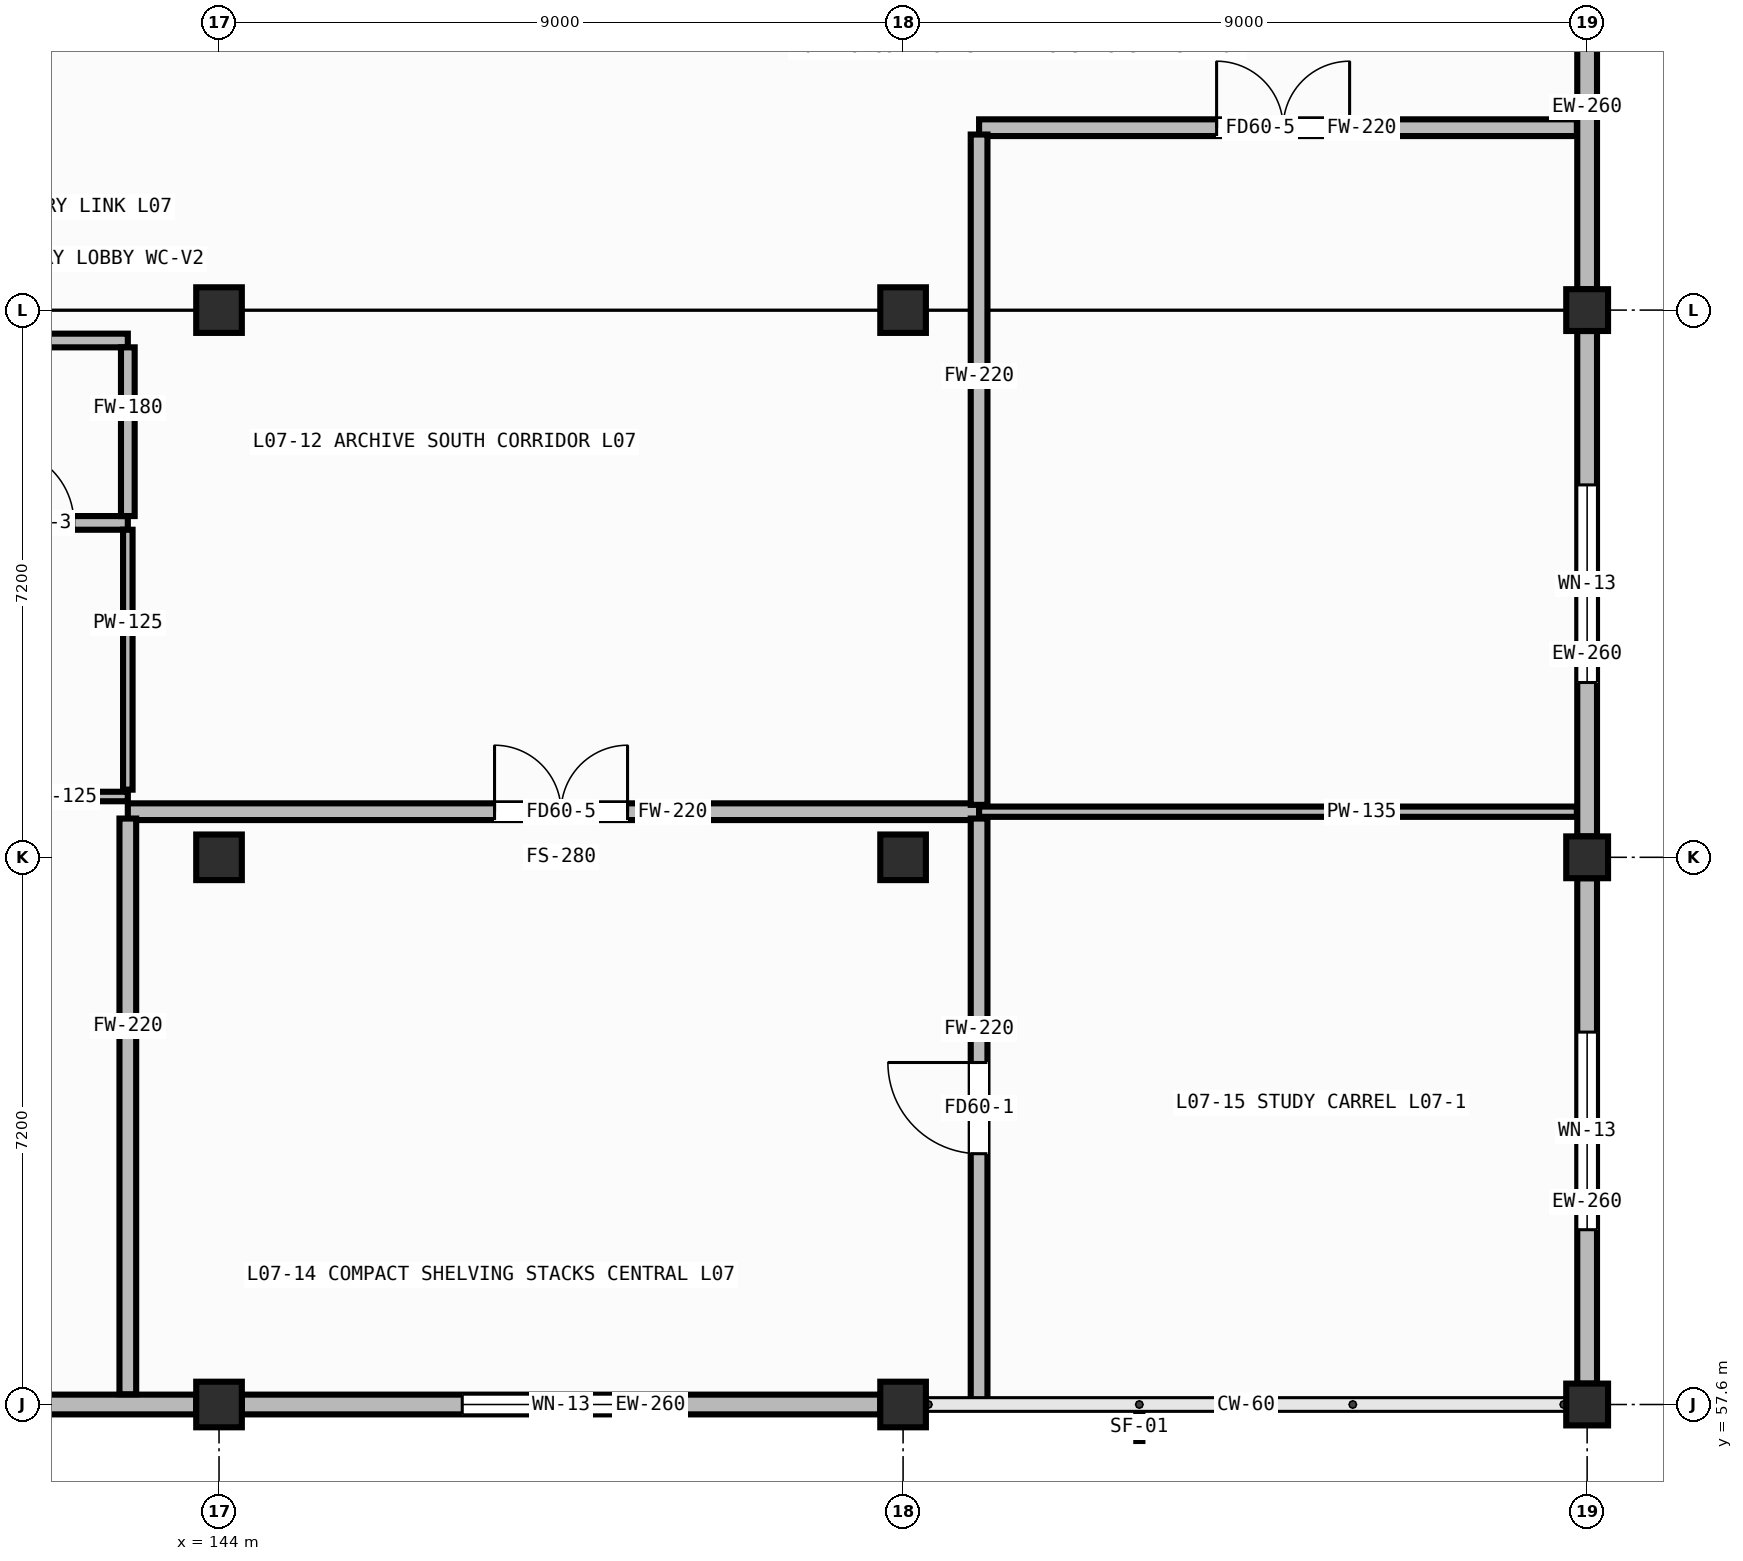
"""IFC4 building model, lengths in metres.
Left out: names, types, materials, properties, quantities, classifications, styles, units other than length and angle.
Written with IfcOpenShell. Run it as: python <this file> out.ifc"""

import sys

from ifc_helpers import new_model, si_unit, direction, frame, frame_2d, origin, origin_2d, place, context, subcontext, project, spatial, rectangle, hollow_rectangle, extrude, element, fill, save


model = new_model("IFC4")
c1 = context("Model", 3, precision=1e-05, world=origin(), true_north=direction((0.0, 1.0)))
c2 = subcontext(c1, "Body", "Model", "MODEL_VIEW")
j1 = project(units=[si_unit("LENGTHUNIT", "METRE"), si_unit("PLANEANGLEUNIT", "RADIAN")], contexts=[c1])
p1 = place(None, origin())
s1 = spatial("IfcSite", under=j1, at=p1, CompositionType="ELEMENT")
p2 = place(p1, origin())
s2 = spatial("IfcBuilding", under=s1, at=p2, CompositionType="ELEMENT")
p3 = place(p2, frame((0.0, 0.0, 24.2)))
s3 = spatial("IfcBuildingStorey", under=s2, at=p3, CompositionType="ELEMENT", Elevation=24.2)
for number, where, z_axis, x_axis in (
    (1, (144.0, 57.6, 0.0), (0.0, 0.0, 1.0), (1.0, 0.0, 0.0)),
    (2, (144.0, 64.8, 0.0), (0.0, 0.0, 1.0), (1.0, 0.0, 0.0)),
    (3, (144.0, 72.0, 0.0), (0.0, 0.0, 1.0), (1.0, 0.0, 0.0)),
    (4, (153.0, 57.6, 0.0), (0.0, 0.0, 1.0), (1.0, 0.0, 0.0)),
    (5, (153.0, 64.8, 0.0), (0.0, 0.0, 1.0), (1.0, 0.0, 0.0)),
    (6, (153.0, 72.0, 0.0), (0.0, 0.0, 1.0), (1.0, 0.0, 0.0)),
):
    element("IfcColumn", number, at=place(p3, frame(where, z_axis=z_axis, x_axis=x_axis)), inside=s3, PredefinedType="COLUMN", context=c2, shape_type="SweptSolid", body=[
        extrude(hollow_rectangle(XDim=0.6, YDim=0.6, WallThickness=0.025, at=origin_2d()), origin(), (0.0, 0.0, 1.0), 3.6),
    ])
for number, where, z_axis, x_axis in (
    (7, (162.0, 57.6, 0.0), (0.0, 0.0, 1.0), (1.0, 0.0, 0.0)),
    (8, (162.0, 64.8, 0.0), (0.0, 0.0, 1.0), (1.0, 0.0, 0.0)),
    (9, (162.0, 72.0, 0.0), (0.0, 0.0, 1.0), (1.0, 0.0, 0.0)),
):
    element("IfcColumn", number, at=place(p3, frame(where, z_axis=z_axis, x_axis=x_axis)), inside=s3, PredefinedType="COLUMN", context=c2, shape_type="SweptSolid", body=[
        extrude(hollow_rectangle(XDim=0.55, YDim=0.55, WallThickness=0.022, at=origin_2d()), origin(), (0.0, 0.0, 1.0), 3.6),
    ])
p4 = place(p3, frame((135.3, 57.6, 0.0), z_axis=(0.0, 0.0, 1.0), x_axis=(1.0, 0.0, 0.0)))
e10 = element("IfcWall", 10, at=p4, inside=s3, PredefinedType="STANDARD", context=c2, shape_type="SweptSolid", body=[
    extrude(rectangle(XDim=8.4, YDim=0.26, at=frame_2d((4.2, 0.0))), origin(), (0.0, 0.0, 1.0), 2.92),
])
p5 = place(p4, frame((2.9, 0.0, 0.85)))
e11 = element("IfcOpeningElement", 11, at=p5, cuts=e10, PredefinedType="OPENING", context=c2, shape_type="SweptSolid", body=[
    extrude(rectangle(XDim=2.6, YDim=1.6, at=frame_2d((1.3, 0.8))), frame((0.0, 0.142, 0.0), z_axis=(0.0, -1.0, 0.0), x_axis=(1.0, 0.0, 0.0)), (0.0, 0.0, 1.0), 0.284),
])
p6 = place(p3, frame((144.3, 57.6, 0.0), z_axis=(0.0, 0.0, 1.0), x_axis=(1.0, 0.0, 0.0)))
e12 = element("IfcWall", 12, at=p6, inside=s3, PredefinedType="STANDARD", context=c2, shape_type="SweptSolid", body=[
    extrude(rectangle(XDim=8.4, YDim=0.26, at=frame_2d((4.2, 0.0))), origin(), (0.0, 0.0, 1.0), 2.92),
])
p7 = place(p6, frame((2.9, 0.0, 0.85)))
e13 = element("IfcOpeningElement", 13, at=p7, cuts=e12, PredefinedType="OPENING", context=c2, shape_type="SweptSolid", body=[
    extrude(rectangle(XDim=2.6, YDim=1.6, at=frame_2d((1.3, 0.8))), frame((0.0, 0.142, 0.0), z_axis=(0.0, -1.0, 0.0), x_axis=(1.0, 0.0, 0.0)), (0.0, 0.0, 1.0), 0.284),
])
p8 = place(p3, frame((162.0, 64.525, 0.0), z_axis=(0.0, 0.0, 1.0), x_axis=(0.0, -1.0, 0.0)))
e14 = element("IfcWall", 14, at=p8, inside=s3, PredefinedType="STANDARD", context=c2, shape_type="SweptSolid", body=[
    extrude(rectangle(XDim=6.65, YDim=0.26, at=frame_2d((3.325, 0.0))), origin(), (0.0, 0.0, 1.0), 2.92),
])
p9 = place(p8, frame((2.025, 0.0, 0.85)))
e15 = element("IfcOpeningElement", 15, at=p9, cuts=e14, PredefinedType="OPENING", context=c2, shape_type="SweptSolid", body=[
    extrude(rectangle(XDim=2.6, YDim=1.6, at=frame_2d((1.3, 0.8))), frame((0.0, 0.142, 0.0), z_axis=(0.0, -1.0, 0.0), x_axis=(1.0, 0.0, 0.0)), (0.0, 0.0, 1.0), 0.284),
])
p10 = place(p3, frame((162.0, 71.725, 0.0), z_axis=(0.0, 0.0, 1.0), x_axis=(0.0, -1.0, 0.0)))
e16 = element("IfcWall", 16, at=p10, inside=s3, PredefinedType="STANDARD", context=c2, shape_type="SweptSolid", body=[
    extrude(rectangle(XDim=6.65, YDim=0.26, at=frame_2d((3.325, 0.0))), origin(), (0.0, 0.0, 1.0), 2.92),
])
p11 = place(p10, frame((2.025, 0.0, 0.85)))
e17 = element("IfcOpeningElement", 17, at=p11, cuts=e16, PredefinedType="OPENING", context=c2, shape_type="SweptSolid", body=[
    extrude(rectangle(XDim=2.6, YDim=1.6, at=frame_2d((1.3, 0.8))), frame((0.0, 0.142, 0.0), z_axis=(0.0, -1.0, 0.0), x_axis=(1.0, 0.0, 0.0)), (0.0, 0.0, 1.0), 0.284),
])
p12 = place(p3, frame((162.0, 78.925, 0.0), z_axis=(0.0, 0.0, 1.0), x_axis=(0.0, -1.0, 0.0)))
e18 = element("IfcWall", 18, at=p12, inside=s3, PredefinedType="STANDARD", context=c2, shape_type="SweptSolid", body=[
    extrude(rectangle(XDim=6.65, YDim=0.26, at=frame_2d((3.325, 0.0))), origin(), (0.0, 0.0, 1.0), 2.92),
])
p13 = place(p3, frame((135.4, 69.2, 0.0), z_axis=(0.0, 0.0, 1.0), x_axis=(1.0, 0.0, 0.0)))
e19 = element("IfcWall", 19, at=p13, inside=s3, PredefinedType="PARTITIONING", context=c2, shape_type="SweptSolid", body=[
    extrude(rectangle(XDim=7.4, YDim=0.18, at=frame_2d((3.7, 0.0))), origin(), (0.0, 0.0, 1.0), 3.32),
])
p14 = place(p13, frame((0.75, 0.0, 0.0)))
e20 = element("IfcOpeningElement", 20, at=p14, cuts=e19, PredefinedType="OPENING", context=c2, shape_type="SweptSolid", body=[
    extrude(rectangle(XDim=1.0, YDim=2.08, at=frame_2d((0.5, 1.04))), frame((0.0, 0.102, 0.0), z_axis=(0.0, -1.0, 0.0), x_axis=(1.0, 0.0, 0.0)), (0.0, 0.0, 1.0), 0.204),
])
p15 = place(p13, frame((3.225, 0.0, 0.0)))
e21 = element("IfcOpeningElement", 21, at=p15, cuts=e19, PredefinedType="OPENING", context=c2, shape_type="SweptSolid", body=[
    extrude(rectangle(XDim=1.05, YDim=2.1, at=frame_2d((0.525, 1.05))), frame((0.0, 0.102, 0.0), z_axis=(0.0, -1.0, 0.0), x_axis=(1.0, 0.0, 0.0)), (0.0, 0.0, 1.0), 0.204),
])
p16 = place(p13, frame((5.71, 0.0, 0.0)))
e22 = element("IfcOpeningElement", 22, at=p16, cuts=e19, PredefinedType="OPENING", context=c2, shape_type="SweptSolid", body=[
    extrude(rectangle(XDim=0.98, YDim=2.02, at=frame_2d((0.49, 1.01))), frame((0.0, 0.102, 0.0), z_axis=(0.0, -1.0, 0.0), x_axis=(1.0, 0.0, 0.0)), (0.0, 0.0, 1.0), 0.204),
])
p17 = place(p3, frame((135.4, 71.6, 0.0), z_axis=(0.0, 0.0, 1.0), x_axis=(1.0, 0.0, 0.0)))
e23 = element("IfcWall", 23, at=p17, inside=s3, PredefinedType="PARTITIONING", context=c2, shape_type="SweptSolid", body=[
    extrude(rectangle(XDim=7.4, YDim=0.18, at=frame_2d((3.7, 0.0))), origin(), (0.0, 0.0, 1.0), 3.32),
])
p18 = place(p17, frame((3.11, 0.0, 0.0)))
e24 = element("IfcOpeningElement", 24, at=p18, cuts=e23, PredefinedType="OPENING", context=c2, shape_type="SweptSolid", body=[
    extrude(rectangle(XDim=0.98, YDim=2.02, at=frame_2d((0.49, 1.01))), frame((0.0, 0.102, 0.0), z_axis=(0.0, -1.0, 0.0), x_axis=(1.0, 0.0, 0.0)), (0.0, 0.0, 1.0), 0.204),
])
p19 = place(p3, frame((142.8, 69.29, 0.0), z_axis=(0.0, 0.0, 1.0), x_axis=(0.0, 1.0, 0.0)))
e25 = element("IfcWall", 25, at=p19, inside=s3, PredefinedType="PARTITIONING", context=c2, shape_type="SweptSolid", body=[
    extrude(rectangle(XDim=2.22, YDim=0.18, at=frame_2d((1.11, 0.0))), origin(), (0.0, 0.0, 1.0), 3.32),
])
p20 = place(p3, frame((140.4, 65.6, 0.0), z_axis=(0.0, 0.0, 1.0), x_axis=(1.0, 0.0, 0.0)))
e26 = element("IfcWall", 26, at=p20, inside=s3, PredefinedType="PARTITIONING", context=c2, shape_type="SweptSolid", body=[
    extrude(rectangle(XDim=2.4, YDim=0.125, at=frame_2d((1.2, 0.0))), origin(), (0.0, 0.0, 1.0), 3.32),
])
p21 = place(p3, frame((142.8, 65.69, 0.0), z_axis=(0.0, 0.0, 1.0), x_axis=(0.0, 1.0, 0.0)))
e27 = element("IfcWall", 27, at=p21, inside=s3, PredefinedType="PARTITIONING", context=c2, shape_type="SweptSolid", body=[
    extrude(rectangle(XDim=3.42, YDim=0.125, at=frame_2d((1.71, 0.0))), origin(), (0.0, 0.0, 1.0), 3.32),
])
p22 = place(p3, frame((142.8, 65.4, 0.0), z_axis=(0.0, 0.0, 1.0), x_axis=(1.0, 0.0, 0.0)))
e28 = element("IfcWall", 28, at=p22, inside=s3, PredefinedType="PARTITIONING", context=c2, shape_type="SweptSolid", body=[
    extrude(rectangle(XDim=11.2, YDim=0.22, at=frame_2d((5.6, 0.0))), origin(), (0.0, 0.0, 1.0), 3.32),
])
p23 = place(p22, frame((4.825, 0.0, 0.0)))
e29 = element("IfcOpeningElement", 29, at=p23, cuts=e28, PredefinedType="OPENING", context=c2, shape_type="SweptSolid", body=[
    extrude(rectangle(XDim=1.75, YDim=2.12, at=frame_2d((0.875, 1.06))), frame((0.0, 0.122, 0.0), z_axis=(0.0, -1.0, 0.0), x_axis=(1.0, 0.0, 0.0)), (0.0, 0.0, 1.0), 0.244),
])
p24 = place(p3, frame((142.8, 57.735, 0.0), z_axis=(0.0, 0.0, 1.0), x_axis=(0.0, 1.0, 0.0)))
e30 = element("IfcWall", 30, at=p24, inside=s3, PredefinedType="PARTITIONING", context=c2, shape_type="SweptSolid", body=[
    extrude(rectangle(XDim=7.575, YDim=0.22, at=frame_2d((3.788, 0.0))), origin(), (0.0, 0.0, 1.0), 3.32),
])
p25 = place(p3, frame((154.0, 57.635, 0.0), z_axis=(0.0, 0.0, 1.0), x_axis=(0.0, 1.0, 0.0)))
e31 = element("IfcWall", 31, at=p25, inside=s3, PredefinedType="PARTITIONING", context=c2, shape_type="SweptSolid", body=[
    extrude(rectangle(XDim=7.675, YDim=0.22, at=frame_2d((3.837, 0.0))), origin(), (0.0, 0.0, 1.0), 3.32),
])
p26 = place(p25, frame((3.265, 0.0, 0.0)))
e32 = element("IfcOpeningElement", 32, at=p26, cuts=e31, PredefinedType="OPENING", context=c2, shape_type="SweptSolid", body=[
    extrude(rectangle(XDim=1.2, YDim=2.1, at=frame_2d((0.6, 1.05))), frame((0.0, 0.122, 0.0), z_axis=(0.0, -1.0, 0.0), x_axis=(1.0, 0.0, 0.0)), (0.0, 0.0, 1.0), 0.244),
])
p27 = place(p3, frame((154.0, 65.4, 0.0), z_axis=(0.0, 0.0, 1.0), x_axis=(1.0, 0.0, 0.0)))
e33 = element("IfcWall", 33, at=p27, inside=s3, PredefinedType="PARTITIONING", context=c2, shape_type="SweptSolid", body=[
    extrude(rectangle(XDim=7.865, YDim=0.135, at=frame_2d((3.933, 0.0))), origin(), (0.0, 0.0, 1.0), 3.32),
])
p28 = place(p3, frame((154.0, 74.4, 0.0), z_axis=(0.0, 0.0, 1.0), x_axis=(1.0, 0.0, 0.0)))
e34 = element("IfcWall", 34, at=p28, inside=s3, PredefinedType="PARTITIONING", context=c2, shape_type="SweptSolid", body=[
    extrude(rectangle(XDim=7.865, YDim=0.22, at=frame_2d((3.933, 0.0))), origin(), (0.0, 0.0, 1.0), 3.32),
])
p29 = place(p28, frame((3.125, 0.0, 0.0)))
e35 = element("IfcOpeningElement", 35, at=p29, cuts=e34, PredefinedType="OPENING", context=c2, shape_type="SweptSolid", body=[
    extrude(rectangle(XDim=1.75, YDim=2.12, at=frame_2d((0.875, 1.06))), frame((0.0, 0.122, 0.0), z_axis=(0.0, -1.0, 0.0), x_axis=(1.0, 0.0, 0.0)), (0.0, 0.0, 1.0), 0.244),
])
p30 = place(p3, frame((154.0, 65.49, 0.0), z_axis=(0.0, 0.0, 1.0), x_axis=(0.0, 1.0, 0.0)))
e36 = element("IfcWall", 36, at=p30, inside=s3, PredefinedType="PARTITIONING", context=c2, shape_type="SweptSolid", body=[
    extrude(rectangle(XDim=8.82, YDim=0.22, at=frame_2d((4.41, 0.0))), origin(), (0.0, 0.0, 1.0), 3.32),
])
p31 = place(p7, origin())
e37 = element("IfcWindow", 37, at=p31, inside=s3, PartitioningType="DOUBLE_PANEL_VERTICAL", PredefinedType="WINDOW", context=c2, shape_type="SweptSolid", body=[
    extrude(rectangle(XDim=2.6, YDim=1.6, at=frame_2d((1.3, 0.8))), frame((0.0, 0.03, 0.0), z_axis=(0.0, -1.0, 0.0), x_axis=(1.0, 0.0, 0.0)), (0.0, 0.0, 1.0), 0.06),
])
fill(e13, e37)
p32 = place(p9, origin())
e38 = element("IfcWindow", 38, at=p32, inside=s3, PartitioningType="DOUBLE_PANEL_VERTICAL", PredefinedType="WINDOW", context=c2, shape_type="SweptSolid", body=[
    extrude(rectangle(XDim=2.6, YDim=1.6, at=frame_2d((1.3, 0.8))), frame((0.0, 0.03, 0.0), z_axis=(0.0, -1.0, 0.0), x_axis=(1.0, 0.0, 0.0)), (0.0, 0.0, 1.0), 0.06),
])
fill(e15, e38)
p33 = place(p11, origin())
e39 = element("IfcWindow", 39, at=p33, inside=s3, PartitioningType="DOUBLE_PANEL_VERTICAL", PredefinedType="WINDOW", context=c2, shape_type="SweptSolid", body=[
    extrude(rectangle(XDim=2.6, YDim=1.6, at=frame_2d((1.3, 0.8))), frame((0.0, 0.03, 0.0), z_axis=(0.0, -1.0, 0.0), x_axis=(1.0, 0.0, 0.0)), (0.0, 0.0, 1.0), 0.06),
])
fill(e17, e39)
p34 = place(p16, origin())
e40 = element("IfcDoor", 40, at=p34, inside=s3, OperationType="SINGLE_SWING_LEFT", PredefinedType="DOOR", context=c2, shape_type="SweptSolid", body=[
    extrude(rectangle(XDim=0.98, YDim=2.02, at=frame_2d((0.49, 1.01))), frame((0.0, 0.025, 0.0), z_axis=(0.0, -1.0, 0.0), x_axis=(1.0, 0.0, 0.0)), (0.0, 0.0, 1.0), 0.05),
])
fill(e22, e40)
p35 = place(p23, origin())
e41 = element("IfcDoor", 41, at=p35, inside=s3, OperationType="DOUBLE_DOOR_SINGLE_SWING", PredefinedType="DOOR", context=c2, shape_type="SweptSolid", body=[
    extrude(rectangle(XDim=1.75, YDim=2.12, at=frame_2d((0.875, 1.06))), frame((0.0, 0.025, 0.0), z_axis=(0.0, -1.0, 0.0), x_axis=(1.0, 0.0, 0.0)), (0.0, 0.0, 1.0), 0.05),
])
fill(e29, e41)
p36 = place(p26, origin())
e42 = element("IfcDoor", 42, at=p36, inside=s3, OperationType="SINGLE_SWING_RIGHT", PredefinedType="DOOR", context=c2, shape_type="SweptSolid", body=[
    extrude(rectangle(XDim=1.2, YDim=2.1, at=frame_2d((0.6, 1.05))), frame((0.0, 0.025, 0.0), z_axis=(0.0, -1.0, 0.0), x_axis=(1.0, 0.0, 0.0)), (0.0, 0.0, 1.0), 0.05),
])
fill(e32, e42)
p37 = place(p29, origin())
e43 = element("IfcDoor", 43, at=p37, inside=s3, OperationType="DOUBLE_DOOR_SINGLE_SWING", PredefinedType="DOOR", context=c2, shape_type="SweptSolid", body=[
    extrude(rectangle(XDim=1.75, YDim=2.12, at=frame_2d((0.875, 1.06))), frame((0.0, 0.025, 0.0), z_axis=(0.0, -1.0, 0.0), x_axis=(1.0, 0.0, 0.0)), (0.0, 0.0, 1.0), 0.05),
])
fill(e35, e43)
save(model, sys.argv[1])
